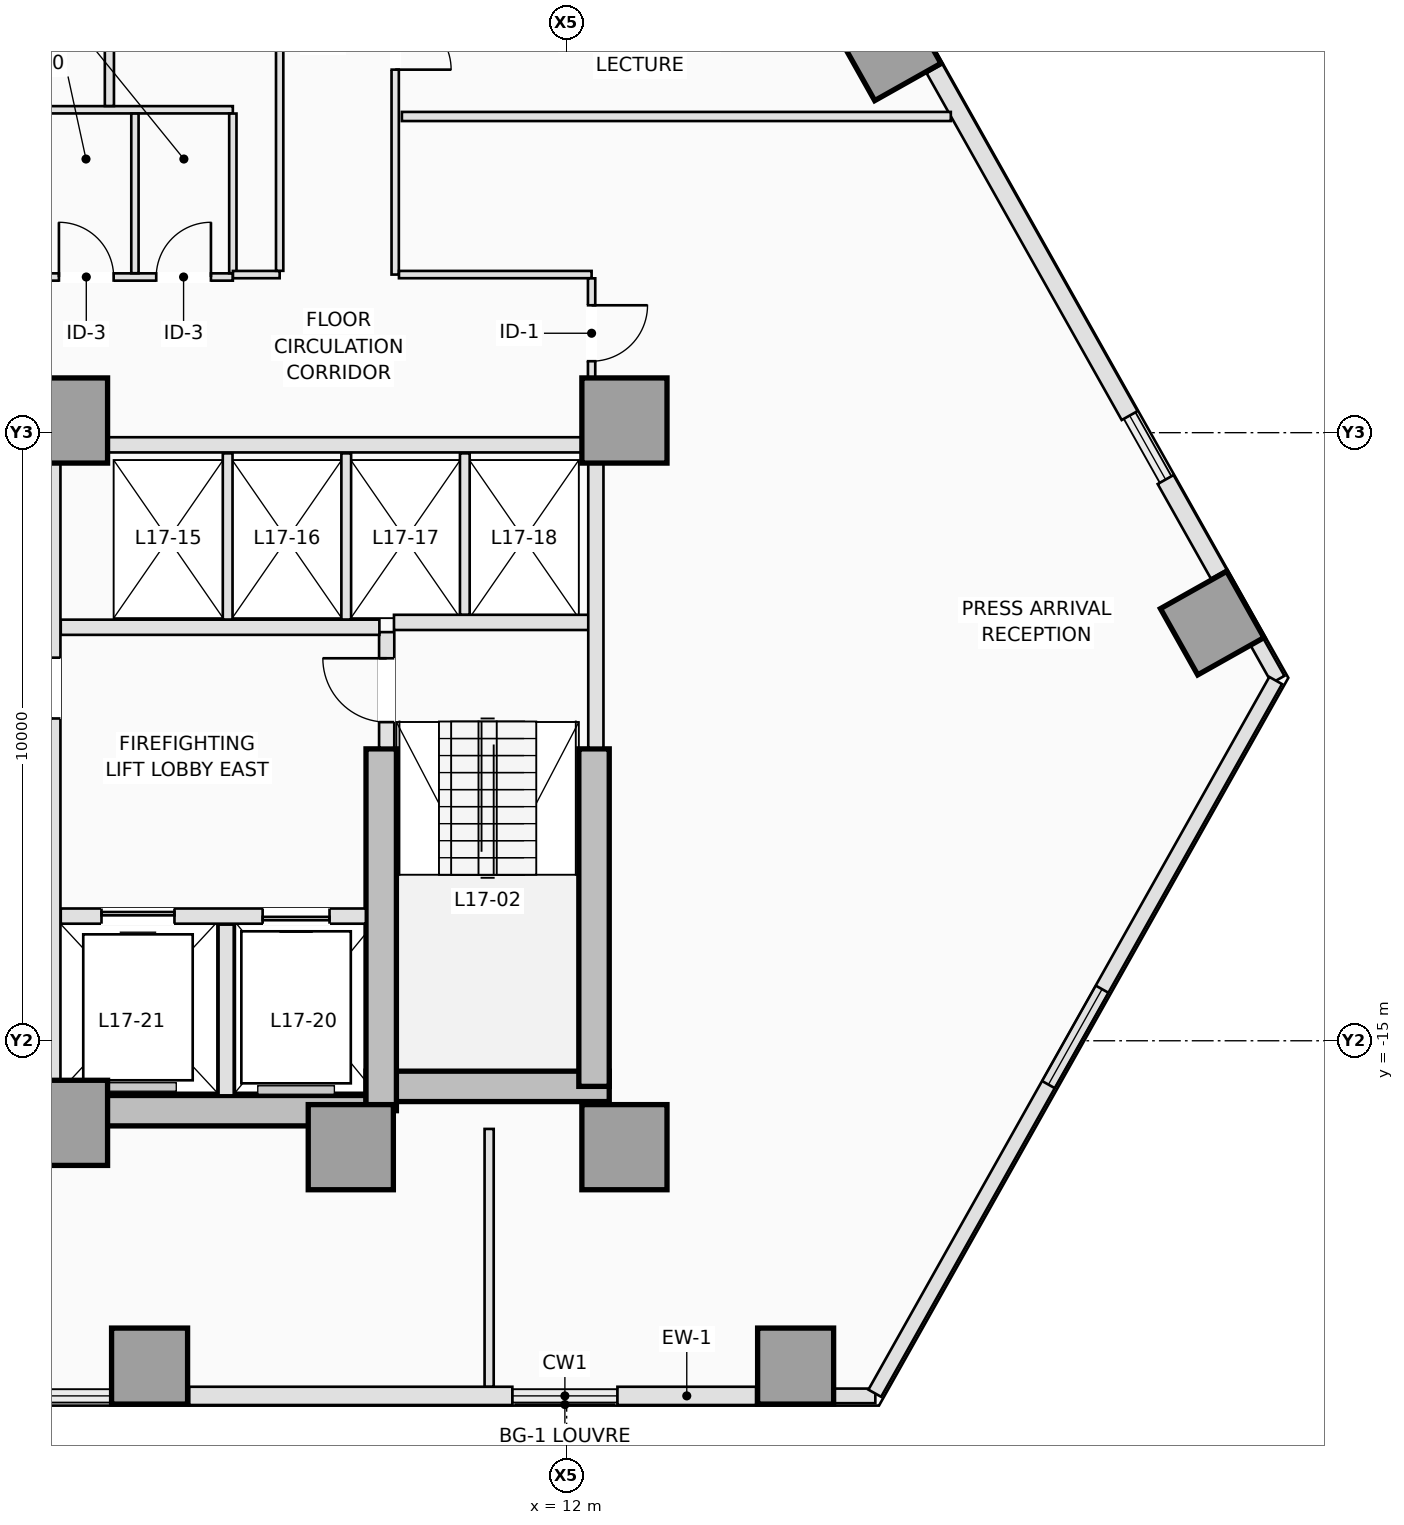
"""IFC4 building model, lengths in metres.
Left out: names, types, materials, properties, quantities, classifications, styles, units other than length and angle.
Written with IfcOpenShell. Run it as: python <this file> out.ifc"""

import sys

from ifc_helpers import new_model, si_unit, direction, frame, frame_2d, origin, origin_2d, place, context, subcontext, project, spatial, rectangle, extrude, element, fill, save


model = new_model("IFC4")
c1 = context("Model", 3, precision=1e-05, world=origin(), true_north=direction((0.0, 1.0)))
c2 = subcontext(c1, "Body", "Model", "MODEL_VIEW")
j1 = project(units=[si_unit("LENGTHUNIT", "METRE"), si_unit("PLANEANGLEUNIT", "RADIAN")], contexts=[c1])
p1 = place(None, origin())
s1 = spatial("IfcSite", under=j1, at=p1, CompositionType="ELEMENT")
p2 = place(p1, origin())
s2 = spatial("IfcBuilding", under=s1, at=p2, CompositionType="ELEMENT")
p3 = place(p2, frame((0.0, 0.0, 66.1)))
s3 = spatial("IfcBuildingStorey", under=s2, at=p3, CompositionType="ELEMENT", Elevation=66.1)
p4 = place(p3, frame((3.75, -16.15, 0.0), z_axis=(0.0, 0.0, 1.0), x_axis=(1.0, 0.0, 0.0)))
e1 = element("IfcWall", 1, at=p4, inside=s3, PredefinedType="SHEAR", context=c2, shape_type="SweptSolid", body=[
    extrude(rectangle(XDim=5.2, YDim=0.5, at=frame_2d((2.6, 0.0))), origin(), (0.0, 0.0, 1.0), 3.5),
])
p5 = place(p3, frame((8.7, -15.75, 0.0), z_axis=(0.0, 0.0, 1.0), x_axis=(1.0, 0.0, 0.0)))
e2 = element("IfcWall", 2, at=p5, inside=s3, PredefinedType="SHEAR", context=c2, shape_type="SweptSolid", body=[
    extrude(rectangle(XDim=4.0, YDim=0.5, at=frame_2d((2.0, 0.0))), origin(), (0.0, 0.0, 1.0), 3.5),
])
p6 = place(p3, frame((12.45, -15.75, 0.0), z_axis=(0.0, 0.0, 1.0), x_axis=(0.0, 1.0, 0.0)))
e3 = element("IfcWall", 3, at=p6, inside=s3, PredefinedType="SHEAR", context=c2, shape_type="SweptSolid", body=[
    extrude(rectangle(XDim=5.55, YDim=0.5, at=frame_2d((2.775, 0.0))), origin(), (0.0, 0.0, 1.0), 3.5),
])
p7 = place(p3, frame((8.95, -16.15, 0.0), z_axis=(0.0, 0.0, 1.0), x_axis=(0.0, 1.0, 0.0)))
e4 = element("IfcWall", 4, at=p7, inside=s3, PredefinedType="SHEAR", context=c2, shape_type="SweptSolid", body=[
    extrude(rectangle(XDim=5.95, YDim=0.5, at=frame_2d((2.975, 0.0))), origin(), (0.0, 0.0, 1.0), 3.5),
])
for number, where, z_axis, x_axis in (
    (5, (3.75, -16.35, 0.0), (0.0, 0.0, 1.0), (1.0, 0.0, 0.0)),
    (6, (8.45, -16.75, 0.0), (0.0, 0.0, 1.0), (1.0, 0.0, 0.0)),
    (7, (12.95, -16.75, 0.0), (0.0, 0.0, 1.0), (1.0, 0.0, 0.0)),
    (8, (3.75, -4.8, 0.0), (0.0, 0.0, 1.0), (1.0, 0.0, 0.0)),
    (9, (12.95, -4.8, 0.0), (0.0, 0.0, 1.0), (1.0, 0.0, 0.0)),
):
    element("IfcColumn", number, at=place(p3, frame(where, z_axis=z_axis, x_axis=x_axis)), inside=s3, PredefinedType="COLUMN", context=c2, shape_type="SweptSolid", body=[
        extrude(rectangle(XDim=1.4, YDim=1.4, at=origin_2d()), origin(), (0.0, 0.0, 1.0), 3.5),
    ])
for number, where, z_axis, x_axis in (
    (10, (5.141, -20.35, 0.0), (0.0, 0.0, 1.0), (0.0, 1.0, 0.0)),
    (11, (15.765, -20.35, 0.0), (0.0, 0.0, 1.0), (0.0, 1.0, 0.0)),
    (12, (22.616, -8.132, 0.0), (0.0, 0.0, 1.0), (0.872, 0.49, 0.0)),
    (13, (17.304, 1.312, 0.0), (0.0, 0.0, 1.0), (0.872, 0.49, 0.0)),
):
    element("IfcColumn", number, at=place(p3, frame(where, z_axis=z_axis, x_axis=x_axis)), inside=s3, PredefinedType="COLUMN", context=c2, shape_type="SweptSolid", body=[
        extrude(rectangle(XDim=1.25, YDim=1.25, at=origin_2d()), origin(), (0.0, 0.0, 1.0), 3.5),
    ])
p8 = place(p3, frame((17.076, -20.84, 0.0), z_axis=(0.0, 0.0, 1.0), x_axis=(-1.0, 0.0, 0.0)))
e14 = element("IfcWall", 14, at=p8, inside=s3, PredefinedType="STANDARD", context=c2, shape_type="SweptSolid", body=[
    extrude(rectangle(XDim=0.681, YDim=0.24, at=frame_2d((0.34, 0.0))), origin(), (0.0, 0.0, 1.0), 3.25),
])
p9 = place(p3, frame((15.115, -20.84, 0.0), z_axis=(0.0, 0.0, 1.0), x_axis=(-1.0, 0.0, 0.0)))
e15 = element("IfcWall", 15, at=p9, inside=s3, PredefinedType="STANDARD", context=c2, shape_type="SweptSolid", body=[
    extrude(rectangle(XDim=2.28, YDim=0.3, at=frame_2d((1.14, 0.0))), origin(), (0.0, 0.0, 1.0), 3.25),
])
p10 = place(p3, frame((11.107, -20.84, 0.0), z_axis=(0.0, 0.0, 1.0), x_axis=(-1.0, 0.0, 0.0)))
e16 = element("IfcWall", 16, at=p10, inside=s3, PredefinedType="STANDARD", context=c2, shape_type="SweptSolid", body=[
    extrude(rectangle(XDim=5.316, YDim=0.3, at=frame_2d((2.658, 0.0))), origin(), (0.0, 0.0, 1.0), 3.25),
])
p11 = place(p3, frame((23.352, -8.441, 0.0), z_axis=(0.0, 0.0, 1.0), x_axis=(0.490523074758, -0.871428203084, 0.0)))
e17 = element("IfcWall", 17, at=p11, inside=s3, PredefinedType="STANDARD", context=c2, shape_type="SweptSolid", body=[
    extrude(rectangle(XDim=0.708, YDim=0.24, at=frame_2d((0.354, 0.0))), origin(), (0.0, 0.0, 1.0), 3.25),
])
p12 = place(p3, frame((18.05, 0.986, 0.0), z_axis=(0.0, 0.0, 1.0), x_axis=(0.490254155105, -0.871579522133, 0.0)))
e18 = element("IfcWall", 18, at=p12, inside=s3, PredefinedType="STANDARD", context=c2, shape_type="SweptSolid", body=[
    extrude(rectangle(XDim=6.545, YDim=0.3, at=frame_2d((3.272, 0.0))), origin(), (0.0, 0.0, 1.0), 3.25),
])
p13 = place(p3, frame((21.85, -5.771, 0.0), z_axis=(0.0, 0.0, 1.0), x_axis=(0.490274239922, -0.871568224334, 0.0)))
e19 = element("IfcWall", 19, at=p13, inside=s3, PredefinedType="STANDARD", context=c2, shape_type="SweptSolid", body=[
    extrude(rectangle(XDim=1.783, YDim=0.3, at=frame_2d((0.892, 0.0))), origin(), (0.0, 0.0, 1.0), 3.25),
])
p14 = place(p3, frame((17.067, -20.796, 0.0), z_axis=(0.0, 0.0, 1.0), x_axis=(0.490268135177, 0.871571658345, 0.0)))
e20 = element("IfcWall", 20, at=p14, inside=s3, PredefinedType="STANDARD", context=c2, shape_type="SweptSolid", body=[
    extrude(rectangle(XDim=13.448, YDim=0.24, at=frame_2d((6.724, 0.0))), origin(), (0.0, 0.0, 1.0), 3.25),
])
p15 = place(p14, frame((5.824, 0.0, 0.9)))
e21 = element("IfcOpeningElement", 21, at=p15, cuts=e20, PredefinedType="OPENING", context=c2, shape_type="SweptSolid", body=[
    extrude(rectangle(XDim=1.8, YDim=2.1, at=frame_2d((0.9, 1.05))), frame((0.0, 0.13, 0.0), z_axis=(0.0, -1.0, 0.0), x_axis=(1.0, 0.0, 0.0)), (0.0, 0.0, 1.0), 0.26),
])
p16 = place(p3, frame((9.04, -10.18, 0.0), z_axis=(0.0, 0.0, 1.0), x_axis=(0.0, 1.0, 0.0)))
e22 = element("IfcWall", 22, at=p16, inside=s3, PredefinedType="PARTITIONING", context=c2, shape_type="SweptSolid", body=[
    extrude(rectangle(XDim=1.9, YDim=0.25, at=frame_2d((0.95, 0.0))), origin(), (0.0, 0.0, 1.0), 3.25),
])
p17 = place(p16, frame((0.42, 0.0, 0.0)))
e23 = element("IfcOpeningElement", 23, at=p17, cuts=e22, PredefinedType="OPENING", context=c2, shape_type="SweptSolid", body=[
    extrude(rectangle(XDim=1.05, YDim=2.15, at=frame_2d((0.525, 1.075))), frame((0.0, 0.135, 0.0), z_axis=(0.0, -1.0, 0.0), x_axis=(1.0, 0.0, 0.0)), (0.0, 0.0, 1.0), 0.27),
])
p18 = place(p3, frame((9.16, -8.12, 0.0), z_axis=(0.0, 0.0, 1.0), x_axis=(1.0, 0.0, 0.0)))
e24 = element("IfcWall", 24, at=p18, inside=s3, PredefinedType="PARTITIONING", context=c2, shape_type="SweptSolid", body=[
    extrude(rectangle(XDim=3.22, YDim=0.25, at=frame_2d((1.61, 0.0))), origin(), (0.0, 0.0, 1.0), 3.25),
])
p19 = place(p3, frame((12.48, -10.18, 0.0), z_axis=(0.0, 0.0, 1.0), x_axis=(0.0, 1.0, 0.0)))
e25 = element("IfcWall", 25, at=p19, inside=s3, PredefinedType="PARTITIONING", context=c2, shape_type="SweptSolid", body=[
    extrude(rectangle(XDim=4.678, YDim=0.25, at=frame_2d((2.339, 0.0))), origin(), (0.0, 0.0, 1.0), 3.25),
])
p20 = place(p3, frame((3.68, -12.95, 0.0), z_axis=(0.0, 0.0, 1.0), x_axis=(1.0, 0.0, 0.0)))
e26 = element("IfcWall", 26, at=p20, inside=s3, PredefinedType="PARTITIONING", context=c2, shape_type="SweptSolid", body=[
    extrude(rectangle(XDim=5.018, YDim=0.25, at=frame_2d((2.509, 0.0))), origin(), (0.0, 0.0, 1.0), 3.25),
])
p21 = place(p20, frame((3.32, 0.0, 0.0)))
e27 = element("IfcOpeningElement", 27, at=p21, cuts=e26, PredefinedType="OPENING", context=c2, shape_type="SweptSolid", body=[
    extrude(rectangle(XDim=1.1, YDim=2.15, at=frame_2d((0.55, 1.075))), frame((0.0, 0.135, 0.0), z_axis=(0.0, -1.0, 0.0), x_axis=(1.0, 0.0, 0.0)), (0.0, 0.0, 1.0), 0.27),
])
p22 = place(p20, frame((0.67, 0.0, 0.0)))
e28 = element("IfcOpeningElement", 28, at=p22, cuts=e26, PredefinedType="OPENING", context=c2, shape_type="SweptSolid", body=[
    extrude(rectangle(XDim=1.2, YDim=2.15, at=frame_2d((0.6, 1.075))), frame((0.0, 0.135, 0.0), z_axis=(0.0, -1.0, 0.0), x_axis=(1.0, 0.0, 0.0)), (0.0, 0.0, 1.0), 0.27),
])
p23 = place(p3, frame((6.4, -15.898, 0.0), z_axis=(0.0, 0.0, 1.0), x_axis=(0.0, 1.0, 0.0)))
e29 = element("IfcWall", 29, at=p23, inside=s3, PredefinedType="PARTITIONING", context=c2, shape_type="SweptSolid", body=[
    extrude(rectangle(XDim=2.808, YDim=0.25, at=frame_2d((1.404, 0.0))), origin(), (0.0, 0.0, 1.0), 3.25),
])
p24 = place(p3, frame((3.68, -8.2, 0.0), z_axis=(0.0, 0.0, 1.0), x_axis=(1.0, 0.0, 0.0)))
e30 = element("IfcWall", 30, at=p24, inside=s3, PredefinedType="PARTITIONING", context=c2, shape_type="SweptSolid", body=[
    extrude(rectangle(XDim=5.24, YDim=0.25, at=frame_2d((2.62, 0.0))), origin(), (0.0, 0.0, 1.0), 3.25),
])
p25 = place(p3, frame((3.55, -15.648, 0.0), z_axis=(0.0, 0.0, 1.0), x_axis=(0.0, 1.0, 0.0)))
e31 = element("IfcWall", 31, at=p25, inside=s3, PredefinedType="PARTITIONING", context=c2, shape_type="SweptSolid", body=[
    extrude(rectangle(XDim=10.146, YDim=0.25, at=frame_2d((5.073, 0.0))), origin(), (0.0, 0.0, 1.0), 3.25),
])
p26 = place(p25, frame((5.948, 0.0, 0.0)))
e32 = element("IfcOpeningElement", 32, at=p26, cuts=e31, PredefinedType="OPENING", context=c2, shape_type="SweptSolid", body=[
    extrude(rectangle(XDim=1.0, YDim=2.15, at=frame_2d((0.5, 1.075))), frame((0.0, 0.135, 0.0), z_axis=(0.0, -1.0, 0.0), x_axis=(1.0, 0.0, 0.0)), (0.0, 0.0, 1.0), 0.27),
])
p27 = place(p3, frame((4.452, -5.2, 0.0), z_axis=(0.0, 0.0, 1.0), x_axis=(1.0, 0.0, 0.0)))
e33 = element("IfcWall", 33, at=p27, inside=s3, PredefinedType="PARTITIONING", context=c2, shape_type="SweptSolid", body=[
    extrude(rectangle(XDim=7.796, YDim=0.25, at=frame_2d((3.898, 0.0))), origin(), (0.0, 0.0, 1.0), 3.25),
])
for number, where, z_axis, x_axis in (
    (34, (6.425, -8.073, 0.0), (0.0, 0.0, 1.0), (0.0, 1.0, 0.0)),
    (35, (8.375, -8.073, 0.0), (0.0, 0.0, 1.0), (0.0, 1.0, 0.0)),
):
    element("IfcWall", number, at=place(p3, frame(where, z_axis=z_axis, x_axis=x_axis)), inside=s3, PredefinedType="PARTITIONING", context=c2, shape_type="SweptSolid", body=[
        extrude(rectangle(XDim=2.733, YDim=0.16, at=frame_2d((1.366, 0.0))), origin(), (0.0, 0.0, 1.0), 3.25),
    ])
p28 = place(p3, frame((10.325, -7.993, 0.0), z_axis=(0.0, 0.0, 1.0), x_axis=(0.0, 1.0, 0.0)))
e36 = element("IfcWall", 36, at=p28, inside=s3, PredefinedType="PARTITIONING", context=c2, shape_type="SweptSolid", body=[
    extrude(rectangle(XDim=2.653, YDim=0.16, at=frame_2d((1.326, 0.0))), origin(), (0.0, 0.0, 1.0), 3.25),
])
p29 = place(p3, frame((3.29, -2.44, 0.0), z_axis=(0.0, 0.0, 1.0), x_axis=(1.0, 0.0, 0.0)))
e37 = element("IfcWall", 37, at=p29, inside=s3, PredefinedType="PARTITIONING", context=c2, shape_type="SweptSolid", body=[
    extrude(rectangle(XDim=3.22, YDim=0.12, at=frame_2d((1.61, 0.0))), origin(), (0.0, 0.0, 1.0), 3.25),
])
p30 = place(p29, frame((0.36, 0.0, 0.0)))
e38 = element("IfcOpeningElement", 38, at=p30, cuts=e37, PredefinedType="OPENING", context=c2, shape_type="SweptSolid", body=[
    extrude(rectangle(XDim=0.9, YDim=2.12, at=frame_2d((0.45, 1.06))), frame((0.0, 0.07, 0.0), z_axis=(0.0, -1.0, 0.0), x_axis=(1.0, 0.0, 0.0)), (0.0, 0.0, 1.0), 0.14),
])
p31 = place(p29, frame((1.96, 0.0, 0.0)))
e39 = element("IfcOpeningElement", 39, at=p31, cuts=e37, PredefinedType="OPENING", context=c2, shape_type="SweptSolid", body=[
    extrude(rectangle(XDim=0.9, YDim=2.12, at=frame_2d((0.45, 1.06))), frame((0.0, 0.07, 0.0), z_axis=(0.0, -1.0, 0.0), x_axis=(1.0, 0.0, 0.0)), (0.0, 0.0, 1.0), 0.14),
])
p32 = place(p3, frame((3.29, 0.31, 0.0), z_axis=(0.0, 0.0, 1.0), x_axis=(1.0, 0.0, 0.0)))
e40 = element("IfcWall", 40, at=p32, inside=s3, PredefinedType="PARTITIONING", context=c2, shape_type="SweptSolid", body=[
    extrude(rectangle(XDim=3.22, YDim=0.12, at=frame_2d((1.61, 0.0))), origin(), (0.0, 0.0, 1.0), 2.844),
])
for number, where, z_axis, x_axis in (
    (41, (4.9, -2.378, 0.0), (0.0, 0.0, 1.0), (0.0, 1.0, 0.0)),
    (42, (6.51, -2.378, 0.0), (0.0, 0.0, 1.0), (0.0, 1.0, 0.0)),
):
    element("IfcWall", number, at=place(p3, frame(where, z_axis=z_axis, x_axis=x_axis)), inside=s3, PredefinedType="PARTITIONING", context=c2, shape_type="SweptSolid", body=[
        extrude(rectangle(XDim=2.626, YDim=0.12, at=frame_2d((1.313, 0.0))), origin(), (0.0, 0.0, 1.0), 3.25),
    ])
p33 = place(p3, frame((6.512, -2.401, 0.0), z_axis=(0.0, 0.0, 1.0), x_axis=(0.999999545332, 0.000953591429, 0.0)))
e43 = element("IfcWall", 43, at=p33, inside=s3, PredefinedType="PARTITIONING", context=c2, shape_type="SweptSolid", body=[
    extrude(rectangle(XDim=0.768, YDim=0.12, at=frame_2d((0.384, 0.0))), origin(), (0.0, 0.0, 1.0), 3.25),
])
p34 = place(p3, frame((7.28, -2.338, 0.0), z_axis=(0.0, 0.0, 1.0), x_axis=(0.0, 1.0, 0.0)))
e44 = element("IfcWall", 44, at=p34, inside=s3, PredefinedType="PARTITIONING", context=c2, shape_type="SweptSolid", body=[
    extrude(rectangle(XDim=9.948, YDim=0.12, at=frame_2d((4.974, 0.0))), origin(), (0.0, 0.0, 1.0), 3.25),
])
p35 = place(p34, frame((4.483, 0.0, 0.0)))
e45 = element("IfcOpeningElement", 45, at=p35, cuts=e44, PredefinedType="OPENING", context=c2, shape_type="SweptSolid", body=[
    extrude(rectangle(XDim=0.92, YDim=2.12, at=frame_2d((0.46, 1.06))), frame((0.0, 0.07, 0.0), z_axis=(0.0, -1.0, 0.0), x_axis=(1.0, 0.0, 0.0)), (0.0, 0.0, 1.0), 0.14),
])
p36 = place(p3, frame((9.18, 7.548, 0.0), z_axis=(0.0, 0.0, 1.0), x_axis=(0.0, -1.0, 0.0)))
e46 = element("IfcWall", 46, at=p36, inside=s3, PredefinedType="PARTITIONING", context=c2, shape_type="SweptSolid", body=[
    extrude(rectangle(XDim=9.948, YDim=0.12, at=frame_2d((4.974, 0.0))), origin(), (0.0, 0.0, 1.0), 3.25),
])
p37 = place(p36, frame((5.658, 0.0, 0.0)))
e47 = element("IfcOpeningElement", 47, at=p37, cuts=e46, PredefinedType="OPENING", context=c2, shape_type="SweptSolid", body=[
    extrude(rectangle(XDim=0.92, YDim=2.12, at=frame_2d((0.46, 1.06))), frame((0.0, 0.07, 0.0), z_axis=(0.0, -1.0, 0.0), x_axis=(1.0, 0.0, 0.0)), (0.0, 0.0, 1.0), 0.14),
])
p38 = place(p3, frame((9.242, -2.4, 0.0), z_axis=(0.0, 0.0, 1.0), x_axis=(1.0, 0.0, 0.0)))
e48 = element("IfcWall", 48, at=p38, inside=s3, PredefinedType="PARTITIONING", context=c2, shape_type="SweptSolid", body=[
    extrude(rectangle(XDim=3.168, YDim=0.12, at=frame_2d((1.584, 0.0))), origin(), (0.0, 0.0, 1.0), 3.25),
])
p39 = place(p3, frame((12.41, -2.462, 0.0), z_axis=(0.0, 0.0, 1.0), x_axis=(0.0, -1.0, 0.0)))
e49 = element("IfcWall", 49, at=p39, inside=s3, PredefinedType="PARTITIONING", context=c2, shape_type="SweptSolid", body=[
    extrude(rectangle(XDim=1.636, YDim=0.12, at=frame_2d((0.818, 0.0))), origin(), (0.0, 0.0, 1.0), 3.25),
])
p40 = place(p39, frame((0.443, 0.0, 0.0)))
e50 = element("IfcOpeningElement", 50, at=p40, cuts=e49, PredefinedType="OPENING", context=c2, shape_type="SweptSolid", body=[
    extrude(rectangle(XDim=0.92, YDim=2.12, at=frame_2d((0.46, 1.06))), frame((0.0, 0.07, 0.0), z_axis=(0.0, -1.0, 0.0), x_axis=(1.0, 0.0, 0.0)), (0.0, 0.0, 1.0), 0.14),
])
p41 = place(p3, frame((4.48, 21.15, 0.0), z_axis=(0.0, 0.0, 1.0), x_axis=(0.0, -1.0, 0.0)))
e51 = element("IfcWall", 51, at=p41, inside=s3, PredefinedType="PARTITIONING", context=c2, shape_type="SweptSolid", body=[
    extrude(rectangle(XDim=20.778, YDim=0.15, at=frame_2d((10.389, 0.0))), origin(), (0.0, 0.0, 1.0), 2.638),
])
p42 = place(p3, frame((18.317, 0.2, 0.0), z_axis=(0.0, 0.0, 1.0), x_axis=(-1.0, 0.0, 0.0)))
e52 = element("IfcWall", 52, at=p42, inside=s3, PredefinedType="PARTITIONING", context=c2, shape_type="SweptSolid", body=[
    extrude(rectangle(XDim=9.027, YDim=0.15, at=frame_2d((4.514, 0.0))), origin(), (0.0, 0.0, 1.0), 3.25),
])
p43 = place(p3, frame((10.725, -20.688, 0.0), z_axis=(0.0, 0.0, 1.0), x_axis=(0.0, 1.0, 0.0)))
e53 = element("IfcWall", 53, at=p43, inside=s3, PredefinedType="PARTITIONING", context=c2, shape_type="SweptSolid", body=[
    extrude(rectangle(XDim=4.238, YDim=0.15, at=frame_2d((2.119, 0.0))), origin(), (0.0, 0.0, 1.0), 3.25),
])
p44 = place(p15, origin())
e54 = element("IfcWindow", 54, at=p44, inside=s3, PartitioningType="SINGLE_PANEL", PredefinedType="WINDOW", context=c2, shape_type="SweptSolid", body=[
    extrude(rectangle(XDim=1.8, YDim=2.1, at=frame_2d((0.9, 1.05))), frame((0.0, 0.03, 0.0), z_axis=(0.0, -1.0, 0.0), x_axis=(1.0, 0.0, 0.0)), (0.0, 0.0, 1.0), 0.06),
])
fill(e21, e54)
p45 = place(p21, origin())
e55 = element("IfcDoor", 55, at=p45, inside=s3, OperationType="SLIDING_TO_RIGHT", PredefinedType="DOOR", context=c2, shape_type="SweptSolid", body=[
    extrude(rectangle(XDim=1.1, YDim=2.15, at=frame_2d((0.55, 1.075))), frame((0.0, 0.025, 0.0), z_axis=(0.0, -1.0, 0.0), x_axis=(1.0, 0.0, 0.0)), (0.0, 0.0, 1.0), 0.05),
])
fill(e27, e55)
p46 = place(p22, origin())
e56 = element("IfcDoor", 56, at=p46, inside=s3, OperationType="SLIDING_TO_LEFT", PredefinedType="DOOR", context=c2, shape_type="SweptSolid", body=[
    extrude(rectangle(XDim=1.2, YDim=2.15, at=frame_2d((0.6, 1.075))), frame((0.0, 0.025, 0.0), z_axis=(0.0, -1.0, 0.0), x_axis=(1.0, 0.0, 0.0)), (0.0, 0.0, 1.0), 0.05),
])
fill(e28, e56)
p47 = place(p17, origin())
e57 = element("IfcDoor", 57, at=p47, inside=s3, OperationType="SINGLE_SWING_RIGHT", PredefinedType="DOOR", context=c2, shape_type="SweptSolid", body=[
    extrude(rectangle(XDim=1.05, YDim=2.15, at=frame_2d((0.525, 1.075))), frame((0.0, 0.025, 0.0), z_axis=(0.0, -1.0, 0.0), x_axis=(1.0, 0.0, 0.0)), (0.0, 0.0, 1.0), 0.05),
])
fill(e23, e57)
p48 = place(p26, origin())
e58 = element("IfcDoor", 58, at=p48, inside=s3, OperationType="SINGLE_SWING_LEFT", PredefinedType="DOOR", context=c2, shape_type="SweptSolid", body=[
    extrude(rectangle(XDim=1.0, YDim=2.15, at=frame_2d((0.5, 1.075))), frame((0.0, 0.025, 0.0), z_axis=(0.0, -1.0, 0.0), x_axis=(1.0, 0.0, 0.0)), (0.0, 0.0, 1.0), 0.05),
])
fill(e32, e58)
p49 = place(p30, origin())
e59 = element("IfcDoor", 59, at=p49, inside=s3, OperationType="SINGLE_SWING_LEFT", PredefinedType="DOOR", context=c2, shape_type="SweptSolid", body=[
    extrude(rectangle(XDim=0.9, YDim=2.12, at=frame_2d((0.45, 1.06))), frame((0.0, 0.025, 0.0), z_axis=(0.0, -1.0, 0.0), x_axis=(1.0, 0.0, 0.0)), (0.0, 0.0, 1.0), 0.05),
])
fill(e38, e59)
p50 = place(p31, origin())
e60 = element("IfcDoor", 60, at=p50, inside=s3, OperationType="SINGLE_SWING_RIGHT", PredefinedType="DOOR", context=c2, shape_type="SweptSolid", body=[
    extrude(rectangle(XDim=0.9, YDim=2.12, at=frame_2d((0.45, 1.06))), frame((0.0, 0.025, 0.0), z_axis=(0.0, -1.0, 0.0), x_axis=(1.0, 0.0, 0.0)), (0.0, 0.0, 1.0), 0.05),
])
fill(e39, e60)
p51 = place(p37, origin())
e61 = element("IfcDoor", 61, at=p51, inside=s3, OperationType="SINGLE_SWING_RIGHT", PredefinedType="DOOR", context=c2, shape_type="SweptSolid", body=[
    extrude(rectangle(XDim=0.92, YDim=2.12, at=frame_2d((0.46, 1.06))), frame((0.0, 0.025, 0.0), z_axis=(0.0, -1.0, 0.0), x_axis=(1.0, 0.0, 0.0)), (0.0, 0.0, 1.0), 0.05),
])
fill(e47, e61)
p52 = place(p40, origin())
e62 = element("IfcDoor", 62, at=p52, inside=s3, OperationType="SINGLE_SWING_LEFT", PredefinedType="DOOR", context=c2, shape_type="SweptSolid", body=[
    extrude(rectangle(XDim=0.92, YDim=2.12, at=frame_2d((0.46, 1.06))), frame((0.0, 0.025, 0.0), z_axis=(0.0, -1.0, 0.0), x_axis=(1.0, 0.0, 0.0)), (0.0, 0.0, 1.0), 0.05),
])
fill(e50, e62)
save(model, sys.argv[1])
